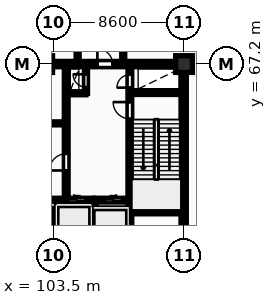
"""IFC4 building model, lengths in metres.
Left out: names, types, materials, properties, quantities, classifications, styles, units other than length and angle.
Written with IfcOpenShell. Run it as: python <this file> out.ifc"""

import sys

from ifc_helpers import new_model, si_unit, direction, frame, frame_2d, origin, origin_2d, place, context, subcontext, project, spatial, rectangle, extrude, element, fill, save


model = new_model("IFC4")
c1 = context("Model", 3, precision=1e-05, world=origin(), true_north=direction((0.0, 1.0)))
c2 = subcontext(c1, "Body", "Model", "MODEL_VIEW")
j1 = project(units=[si_unit("LENGTHUNIT", "METRE"), si_unit("PLANEANGLEUNIT", "RADIAN")], contexts=[c1])
p1 = place(None, origin())
s1 = spatial("IfcSite", under=j1, at=p1, CompositionType="ELEMENT")
p2 = place(p1, origin())
s2 = spatial("IfcBuilding", under=s1, at=p2, CompositionType="ELEMENT")
p3 = place(p2, origin())
s3 = spatial("IfcBuildingStorey", under=s2, at=p3, CompositionType="ELEMENT", Elevation=0.0)
p4 = place(p3, frame((112.1, 67.2, 0.0), z_axis=(0.0, 0.0, 1.0), x_axis=(1.0, 0.0, 0.0)))
e1 = element("IfcColumn", 1, at=p4, inside=s3, PredefinedType="COLUMN", context=c2, shape_type="SweptSolid", body=[
    extrude(rectangle(XDim=1.1, YDim=1.1, at=origin_2d()), origin(), (0.0, 0.0, 1.0), 5.4),
])
p5 = place(p3, frame((112.075, 55.375, 0.0), z_axis=(0.0, 0.0, 1.0), x_axis=(0.0, 1.0, 0.0)))
e2 = element("IfcWall", 2, at=p5, inside=s3, PredefinedType="SHEAR", context=c2, shape_type="SweptSolid", body=[
    extrude(rectangle(XDim=11.65, YDim=0.35, at=frame_2d((5.825, 0.0))), origin(), (0.0, 0.0, 1.0), 5.4),
])
p6 = place(p3, frame((75.95, 67.2, 0.0), z_axis=(0.0, 0.0, 1.0), x_axis=(1.0, 0.0, 0.0)))
e3 = element("IfcWall", 3, at=p6, inside=s3, PredefinedType="SHEAR", context=c2, shape_type="SweptSolid", body=[
    extrude(rectangle(XDim=36.3, YDim=0.35, at=frame_2d((18.15, 0.0))), origin(), (0.0, 0.0, 1.0), 5.4),
])
p7 = place(p6, frame((5.25, 0.0, 0.0)))
e4 = element("IfcOpeningElement", 4, at=p7, cuts=e3, PredefinedType="OPENING", context=c2, shape_type="SweptSolid", body=[
    extrude(rectangle(XDim=1.0, YDim=2.15, at=frame_2d((0.5, 1.075))), frame((0.0, 0.185, 0.0), z_axis=(0.0, -1.0, 0.0), x_axis=(1.0, 0.0, 0.0)), (0.0, 0.0, 1.0), 0.37),
])
p8 = place(p6, frame((21.6, 0.0, 0.0)))
e5 = element("IfcOpeningElement", 5, at=p8, cuts=e3, PredefinedType="OPENING", context=c2, shape_type="SweptSolid", body=[
    extrude(rectangle(XDim=1.5, YDim=2.2, at=frame_2d((0.75, 1.1))), frame((0.0, 0.185, 0.0), z_axis=(0.0, -1.0, 0.0), x_axis=(1.0, 0.0, 0.0)), (0.0, 0.0, 1.0), 0.37),
])
p9 = place(p6, frame((30.45, 0.0, 0.0)))
e6 = element("IfcOpeningElement", 6, at=p9, cuts=e3, PredefinedType="OPENING", context=c2, shape_type="SweptSolid", body=[
    extrude(rectangle(XDim=1.0, YDim=2.15, at=frame_2d((0.5, 1.075))), frame((0.0, 0.185, 0.0), z_axis=(0.0, -1.0, 0.0), x_axis=(1.0, 0.0, 0.0)), (0.0, 0.0, 1.0), 0.37),
])
p10 = place(p3, frame((103.85, 55.4, 0.0), z_axis=(0.0, 0.0, 1.0), x_axis=(0.0, 1.0, 0.0)))
e7 = element("IfcWall", 7, at=p10, inside=s3, PredefinedType="PARTITIONING", context=c2, shape_type="SweptSolid", body=[
    extrude(rectangle(XDim=2.72, YDim=0.2, at=frame_2d((1.36, 0.0))), origin(), (0.0, 0.0, 1.0), 5.1),
])
p11 = place(p3, frame((101.55, 58.25, 0.0), z_axis=(0.0, 0.0, 1.0), x_axis=(1.0, 0.0, 0.0)))
e8 = element("IfcWall", 8, at=p11, inside=s3, PredefinedType="SHEAR", context=c2, shape_type="SweptSolid", body=[
    extrude(rectangle(XDim=4.6, YDim=0.25, at=frame_2d((2.3, 0.0))), origin(), (0.0, 0.0, 1.0), 5.4),
])
p12 = place(p11, frame((0.54, 0.0, 0.0)))
e9 = element("IfcOpeningElement", 9, at=p12, cuts=e8, PredefinedType="OPENING", context=c2, shape_type="SweptSolid", body=[
    extrude(rectangle(XDim=1.12, YDim=2.12, at=frame_2d((0.56, 1.06))), frame((0.0, 0.135, 0.0), z_axis=(0.0, -1.0, 0.0), x_axis=(1.0, 0.0, 0.0)), (0.0, 0.0, 1.0), 0.27),
])
p13 = place(p11, frame((2.94, 0.0, 0.0)))
e10 = element("IfcOpeningElement", 10, at=p13, cuts=e8, PredefinedType="OPENING", context=c2, shape_type="SweptSolid", body=[
    extrude(rectangle(XDim=1.12, YDim=2.12, at=frame_2d((0.56, 1.06))), frame((0.0, 0.135, 0.0), z_axis=(0.0, -1.0, 0.0), x_axis=(1.0, 0.0, 0.0)), (0.0, 0.0, 1.0), 0.27),
])
p14 = place(p3, frame((106.22, 55.4, 0.0), z_axis=(0.0, 0.0, 1.0), x_axis=(0.0, 1.0, 0.0)))
e11 = element("IfcWall", 11, at=p14, inside=s3, PredefinedType="SHEAR", context=c2, shape_type="SweptSolid", body=[
    extrude(rectangle(XDim=2.85, YDim=0.25, at=frame_2d((1.425, 0.0))), origin(), (0.0, 0.0, 1.0), 5.4),
])
p15 = place(p3, frame((106.22, 58.25, 0.0), z_axis=(0.0, 0.0, 1.0), x_axis=(1.0, 0.0, 0.0)))
e12 = element("IfcWall", 12, at=p15, inside=s3, PredefinedType="SHEAR", context=c2, shape_type="SweptSolid", body=[
    extrude(rectangle(XDim=2.46, YDim=0.25, at=frame_2d((1.23, 0.0))), origin(), (0.0, 0.0, 1.0), 5.4),
])
p16 = place(p15, frame((0.67, 0.0, 0.0)))
e13 = element("IfcOpeningElement", 13, at=p16, cuts=e12, PredefinedType="OPENING", context=c2, shape_type="SweptSolid", body=[
    extrude(rectangle(XDim=1.12, YDim=2.12, at=frame_2d((0.56, 1.06))), frame((0.0, 0.135, 0.0), z_axis=(0.0, -1.0, 0.0), x_axis=(1.0, 0.0, 0.0)), (0.0, 0.0, 1.0), 0.27),
])
p17 = place(p3, frame((84.42, 63.3, 0.0), z_axis=(0.0, 0.0, 1.0), x_axis=(1.0, 0.0, 0.0)))
e14 = element("IfcWall", 14, at=p17, inside=s3, PredefinedType="PARTITIONING", context=c2, shape_type="SweptSolid", body=[
    extrude(rectangle(XDim=19.83, YDim=0.2, at=frame_2d((9.915, 0.0))), origin(), (0.0, 0.0, 1.0), 5.1),
])
p18 = place(p17, frame((1.15, 0.0, 0.0)))
e15 = element("IfcOpeningElement", 15, at=p18, cuts=e14, PredefinedType="OPENING", context=c2, shape_type="SweptSolid", body=[
    extrude(rectangle(XDim=0.85, YDim=2.05, at=frame_2d((0.425, 1.025))), frame((0.0, 0.11, 0.0), z_axis=(0.0, -1.0, 0.0), x_axis=(1.0, 0.0, 0.0)), (0.0, 0.0, 1.0), 0.22),
])
p19 = place(p17, frame((3.25, 0.0, 0.0)))
e16 = element("IfcOpeningElement", 16, at=p19, cuts=e14, PredefinedType="OPENING", context=c2, shape_type="SweptSolid", body=[
    extrude(rectangle(XDim=0.85, YDim=2.05, at=frame_2d((0.425, 1.025))), frame((0.0, 0.11, 0.0), z_axis=(0.0, -1.0, 0.0), x_axis=(1.0, 0.0, 0.0)), (0.0, 0.0, 1.0), 0.22),
])
p20 = place(p17, frame((13.08, 0.0, 0.0)))
e17 = element("IfcOpeningElement", 17, at=p20, cuts=e14, PredefinedType="OPENING", context=c2, shape_type="SweptSolid", body=[
    extrude(rectangle(XDim=1.5, YDim=2.2, at=frame_2d((0.75, 1.1))), frame((0.0, 0.11, 0.0), z_axis=(0.0, -1.0, 0.0), x_axis=(1.0, 0.0, 0.0)), (0.0, 0.0, 1.0), 0.22),
])
p21 = place(p17, frame((6.78, 0.0, 0.0)))
e18 = element("IfcOpeningElement", 18, at=p21, cuts=e14, PredefinedType="OPENING", context=c2, shape_type="SweptSolid", body=[
    extrude(rectangle(XDim=0.92, YDim=2.08, at=frame_2d((0.46, 1.04))), frame((0.0, 0.11, 0.0), z_axis=(0.0, -1.0, 0.0), x_axis=(1.0, 0.0, 0.0)), (0.0, 0.0, 1.0), 0.22),
])
p22 = place(p17, frame((16.28, 0.0, 0.0)))
e19 = element("IfcOpeningElement", 19, at=p22, cuts=e14, PredefinedType="OPENING", context=c2, shape_type="SweptSolid", body=[
    extrude(rectangle(XDim=0.92, YDim=2.08, at=frame_2d((0.46, 1.04))), frame((0.0, 0.11, 0.0), z_axis=(0.0, -1.0, 0.0), x_axis=(1.0, 0.0, 0.0)), (0.0, 0.0, 1.0), 0.22),
])
p23 = place(p3, frame((104.45, 65.28, 0.0), z_axis=(0.0, 0.0, 1.0), x_axis=(1.0, 0.0, 0.0)))
e20 = element("IfcWall", 20, at=p23, inside=s3, PredefinedType="PARTITIONING", context=c2, shape_type="SweptSolid", body=[
    extrude(rectangle(XDim=1.2, YDim=0.2, at=frame_2d((0.6, 0.0))), origin(), (0.0, 0.0, 1.0), 5.1),
])
p24 = place(p3, frame((105.65, 65.28, 0.0), z_axis=(0.0, 0.0, 1.0), x_axis=(0.0, 1.0, 0.0)))
e21 = element("IfcWall", 21, at=p24, inside=s3, PredefinedType="PARTITIONING", context=c2, shape_type="SweptSolid", body=[
    extrude(rectangle(XDim=1.72, YDim=0.2, at=frame_2d((0.86, 0.0))), origin(), (0.0, 0.0, 1.0), 5.1),
])
p25 = place(p24, frame((0.4, 0.0, 0.0)))
e22 = element("IfcOpeningElement", 22, at=p25, cuts=e21, PredefinedType="OPENING", context=c2, shape_type="SweptSolid", body=[
    extrude(rectangle(XDim=0.85, YDim=2.05, at=frame_2d((0.425, 1.025))), frame((0.0, 0.11, 0.0), z_axis=(0.0, -1.0, 0.0), x_axis=(1.0, 0.0, 0.0)), (0.0, 0.0, 1.0), 0.22),
])
p26 = place(p3, frame((104.35, 58.4, 0.0), z_axis=(0.0, 0.0, 1.0), x_axis=(0.0, 1.0, 0.0)))
e23 = element("IfcWall", 23, at=p26, inside=s3, PredefinedType="SHEAR", context=c2, shape_type="SweptSolid", body=[
    extrude(rectangle(XDim=8.6, YDim=0.25, at=frame_2d((4.3, 0.0))), origin(), (0.0, 0.0, 1.0), 5.4),
])
p27 = place(p26, frame((1.8, 0.0, 0.0)))
e24 = element("IfcOpeningElement", 24, at=p27, cuts=e23, PredefinedType="OPENING", context=c2, shape_type="SweptSolid", body=[
    extrude(rectangle(XDim=1.1, YDim=2.1, at=frame_2d((0.55, 1.05))), frame((0.0, 0.135, 0.0), z_axis=(0.0, -1.0, 0.0), x_axis=(1.0, 0.0, 0.0)), (0.0, 0.0, 1.0), 0.27),
])
p28 = place(p3, frame((108.535, 55.4, 0.0), z_axis=(0.0, 0.0, 1.0), x_axis=(0.0, 1.0, 0.0)))
e25 = element("IfcWall", 25, at=p28, inside=s3, PredefinedType="SHEAR", context=c2, shape_type="SweptSolid", body=[
    extrude(rectangle(XDim=11.6, YDim=0.25, at=frame_2d((5.8, 0.0))), origin(), (0.0, 0.0, 1.0), 5.4),
])
p29 = place(p28, frame((8.2, 0.0, 0.0)))
e26 = element("IfcOpeningElement", 26, at=p29, cuts=e25, PredefinedType="OPENING", context=c2, shape_type="SweptSolid", body=[
    extrude(rectangle(XDim=1.1, YDim=2.1, at=frame_2d((0.55, 1.05))), frame((0.0, 0.135, 0.0), z_axis=(0.0, -1.0, 0.0), x_axis=(1.0, 0.0, 0.0)), (0.0, 0.0, 1.0), 0.27),
])
p30 = place(p28, frame((10.25, 0.0, 0.0)))
e27 = element("IfcOpeningElement", 27, at=p30, cuts=e25, PredefinedType="OPENING", context=c2, shape_type="SweptSolid", body=[
    extrude(rectangle(XDim=0.85, YDim=2.05, at=frame_2d((0.425, 1.025))), frame((0.0, 0.135, 0.0), z_axis=(0.0, -1.0, 0.0), x_axis=(1.0, 0.0, 0.0)), (0.0, 0.0, 1.0), 0.27),
])
for number, where, z_axis, x_axis in (
    (28, (108.66, 57.475, 0.0), (0.0, 0.0, 1.0), (1.0, 0.0, 0.0)),
    (29, (108.66, 65.325, 0.0), (0.0, 0.0, 1.0), (1.0, 0.0, 0.0)),
):
    element("IfcWall", number, at=place(p3, frame(where, z_axis=z_axis, x_axis=x_axis)), inside=s3, PredefinedType="SHEAR", context=c2, shape_type="SweptSolid", body=[
        extrude(rectangle(XDim=3.24, YDim=0.25, at=frame_2d((1.62, 0.0))), origin(), (0.0, 0.0, 1.0), 5.4),
    ])
p31 = place(p3, frame((105.1, 67.45, 0.0), z_axis=(0.0, 0.0, 1.0), x_axis=(0.0, 1.0, 0.0)))
e30 = element("IfcWall", 30, at=p31, inside=s3, PredefinedType="PARTITIONING", context=c2, shape_type="SweptSolid", body=[
    extrude(rectangle(XDim=41.45, YDim=0.2, at=frame_2d((20.725, 0.0))), origin(), (0.0, 0.0, 1.0), 5.1),
])
p32 = place(p31, frame((16.0, 0.0, 0.0)))
e31 = element("IfcOpeningElement", 31, at=p32, cuts=e30, PredefinedType="OPENING", context=c2, shape_type="SweptSolid", body=[
    extrude(rectangle(XDim=1.1, YDim=2.1, at=frame_2d((0.55, 1.05))), frame((0.0, 0.11, 0.0), z_axis=(0.0, -1.0, 0.0), x_axis=(1.0, 0.0, 0.0)), (0.0, 0.0, 1.0), 0.22),
])
p33 = place(p3, frame((108.1, 67.45, 0.0), z_axis=(0.0, 0.0, 1.0), x_axis=(0.0, 1.0, 0.0)))
e32 = element("IfcWall", 32, at=p33, inside=s3, PredefinedType="PARTITIONING", context=c2, shape_type="SweptSolid", body=[
    extrude(rectangle(XDim=41.45, YDim=0.2, at=frame_2d((20.725, 0.0))), origin(), (0.0, 0.0, 1.0), 5.1),
])
p34 = place(p9, origin())
e33 = element("IfcDoor", 33, at=p34, inside=s3, OperationType="SINGLE_SWING_LEFT", PredefinedType="DOOR", context=c2, shape_type="SweptSolid", body=[
    extrude(rectangle(XDim=1.0, YDim=2.15, at=frame_2d((0.5, 1.075))), frame((0.0, 0.025, 0.0), z_axis=(0.0, -1.0, 0.0), x_axis=(1.0, 0.0, 0.0)), (0.0, 0.0, 1.0), 0.05),
])
fill(e6, e33)
p35 = place(p13, origin())
e34 = element("IfcDoor", 34, at=p35, inside=s3, OperationType="SLIDING_TO_LEFT", PredefinedType="DOOR", context=c2, shape_type="SweptSolid", body=[
    extrude(rectangle(XDim=1.12, YDim=2.12, at=frame_2d((0.56, 1.06))), frame((0.0, 0.025, 0.0), z_axis=(0.0, -1.0, 0.0), x_axis=(1.0, 0.0, 0.0)), (0.0, 0.0, 1.0), 0.05),
])
fill(e10, e34)
p36 = place(p16, origin())
e35 = element("IfcDoor", 35, at=p36, inside=s3, OperationType="SLIDING_TO_RIGHT", PredefinedType="DOOR", context=c2, shape_type="SweptSolid", body=[
    extrude(rectangle(XDim=1.12, YDim=2.12, at=frame_2d((0.56, 1.06))), frame((0.0, 0.025, 0.0), z_axis=(0.0, -1.0, 0.0), x_axis=(1.0, 0.0, 0.0)), (0.0, 0.0, 1.0), 0.05),
])
fill(e13, e35)
p37 = place(p25, origin())
e36 = element("IfcDoor", 36, at=p37, inside=s3, OperationType="SINGLE_SWING_RIGHT", PredefinedType="DOOR", context=c2, shape_type="SweptSolid", body=[
    extrude(rectangle(XDim=0.85, YDim=2.05, at=frame_2d((0.425, 1.025))), frame((0.0, 0.025, 0.0), z_axis=(0.0, -1.0, 0.0), x_axis=(1.0, 0.0, 0.0)), (0.0, 0.0, 1.0), 0.05),
])
fill(e22, e36)
p38 = place(p27, origin())
e37 = element("IfcDoor", 37, at=p38, inside=s3, OperationType="SINGLE_SWING_LEFT", PredefinedType="DOOR", context=c2, shape_type="SweptSolid", body=[
    extrude(rectangle(XDim=1.1, YDim=2.1, at=frame_2d((0.55, 1.05))), frame((0.0, 0.025, 0.0), z_axis=(0.0, -1.0, 0.0), x_axis=(1.0, 0.0, 0.0)), (0.0, 0.0, 1.0), 0.05),
])
fill(e24, e37)
p39 = place(p29, origin())
e38 = element("IfcDoor", 38, at=p39, inside=s3, OperationType="SINGLE_SWING_RIGHT", PredefinedType="DOOR", context=c2, shape_type="SweptSolid", body=[
    extrude(rectangle(XDim=1.1, YDim=2.1, at=frame_2d((0.55, 1.05))), frame((0.0, 0.025, 0.0), z_axis=(0.0, -1.0, 0.0), x_axis=(1.0, 0.0, 0.0)), (0.0, 0.0, 1.0), 0.05),
])
fill(e26, e38)
p40 = place(p30, origin())
e39 = element("IfcDoor", 39, at=p40, inside=s3, OperationType="SINGLE_SWING_LEFT", PredefinedType="DOOR", context=c2, shape_type="SweptSolid", body=[
    extrude(rectangle(XDim=0.85, YDim=2.05, at=frame_2d((0.425, 1.025))), frame((0.0, 0.025, 0.0), z_axis=(0.0, -1.0, 0.0), x_axis=(1.0, 0.0, 0.0)), (0.0, 0.0, 1.0), 0.05),
])
fill(e27, e39)
save(model, sys.argv[1])
